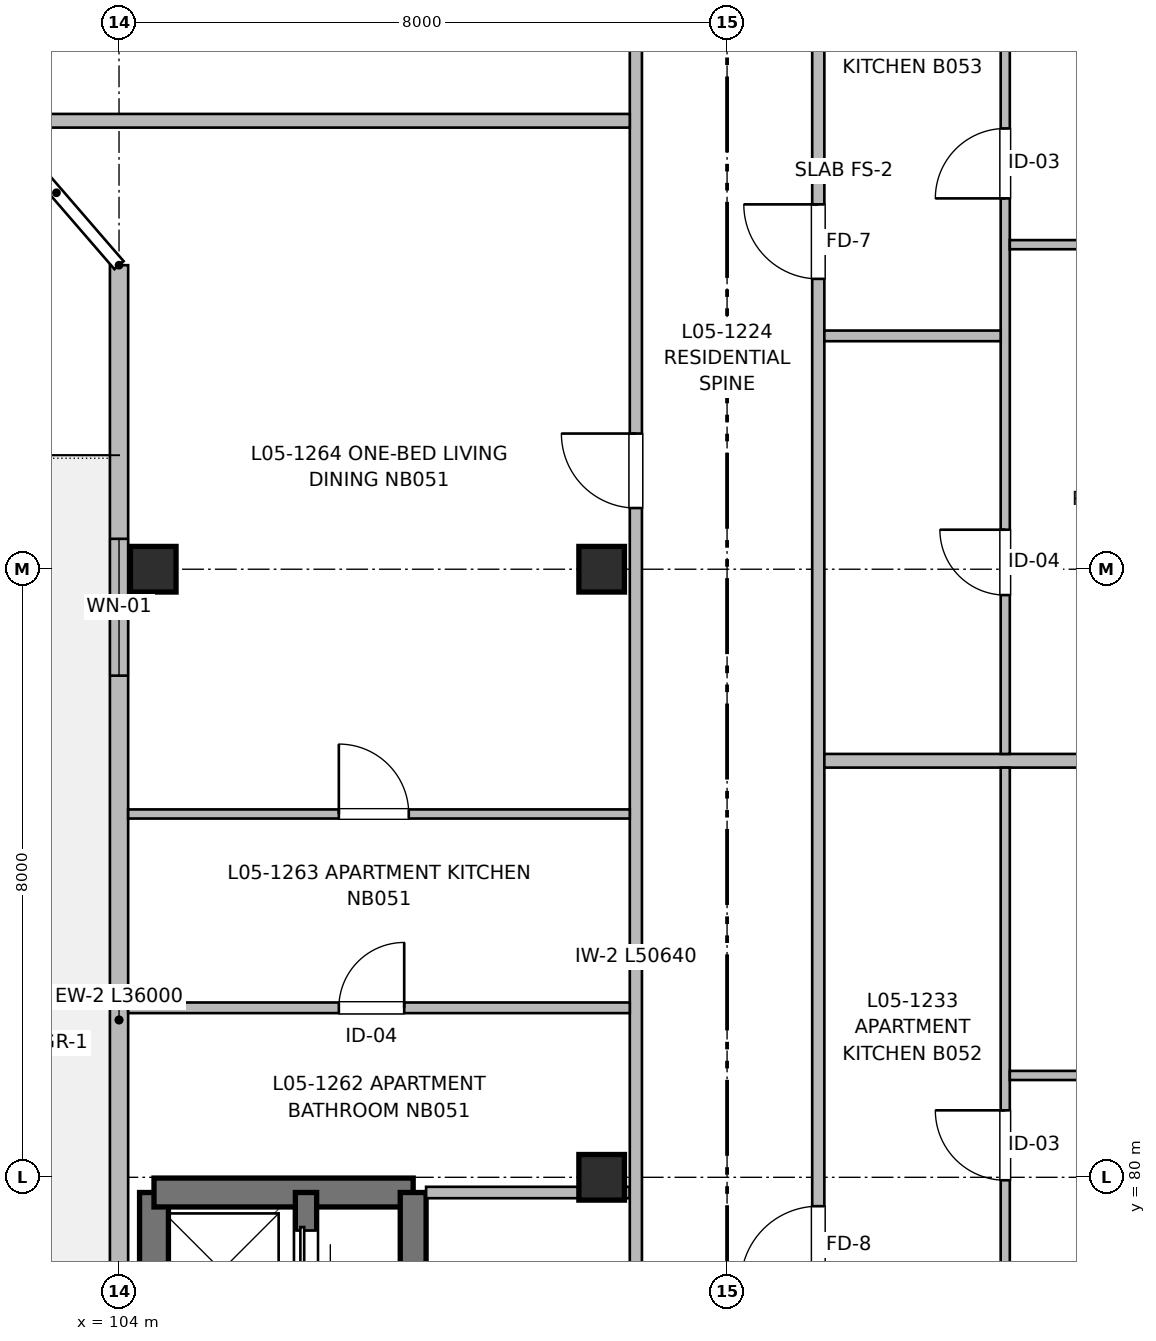
"""IFC4 building model, lengths in metres.
Left out: names, types, materials, properties, quantities, classifications, styles, units other than length and angle.
Written with IfcOpenShell. Run it as: python <this file> out.ifc"""

import sys

from ifc_helpers import new_model, si_unit, direction, frame, frame_2d, origin, origin_2d, place, context, subcontext, project, spatial, rectangle, extrude, element, fill, save


model = new_model("IFC4")
c1 = context("Model", 3, precision=1e-05, world=origin(), true_north=direction((0.0, 1.0)))
c2 = subcontext(c1, "Body", "Model", "MODEL_VIEW")
j1 = project(units=[si_unit("LENGTHUNIT", "METRE"), si_unit("PLANEANGLEUNIT", "RADIAN")], contexts=[c1])
p1 = place(None, origin())
s1 = spatial("IfcSite", under=j1, at=p1, CompositionType="ELEMENT")
p2 = place(p1, origin())
s2 = spatial("IfcBuilding", under=s1, at=p2, CompositionType="ELEMENT")
p3 = place(p2, frame((0.0, 0.0, 16.96)))
s3 = spatial("IfcBuildingStorey", under=s2, at=p3, CompositionType="ELEMENT", Elevation=16.96)
for number, where, z_axis, x_axis in (
    (1, (104.45, 88.0, 0.0), (0.0, 0.0, 1.0), (1.0, 0.0, 0.0)),
    (2, (110.35, 80.0, 0.0), (0.0, 0.0, 1.0), (1.0, 0.0, 0.0)),
    (3, (110.35, 88.0, 0.0), (0.0, 0.0, 1.0), (1.0, 0.0, 0.0)),
):
    element("IfcColumn", number, at=place(p3, frame(where, z_axis=z_axis, x_axis=x_axis)), inside=s3, PredefinedType="COLUMN", context=c2, shape_type="SweptSolid", body=[
        extrude(rectangle(XDim=0.6, YDim=0.6, at=origin_2d()), origin(), (0.0, 0.0, 1.0), 3.2),
    ])
p4 = place(p3, frame((104.46, 67.35, 0.0), z_axis=(0.0, 0.0, 1.0), x_axis=(0.0, 1.0, 0.0)))
e4 = element("IfcWall", 4, at=p4, inside=s3, PredefinedType="SHEAR", context=c2, shape_type="SweptSolid", body=[
    extrude(rectangle(XDim=12.45, YDim=0.38, at=frame_2d((6.225, 0.0))), origin(), (0.0, 0.0, 1.0), 3.2),
])
p5 = place(p4, frame((2.2, 0.0, 0.97)))
e5 = element("IfcOpeningElement", 5, at=p5, cuts=e4, PredefinedType="OPENING", context=c2, shape_type="SweptSolid", body=[
    extrude(rectangle(XDim=0.95, YDim=1.25, at=frame_2d((0.475, 0.625))), frame((0.0, 0.2, 0.0), z_axis=(0.0, -1.0, 0.0), x_axis=(1.0, 0.0, 0.0)), (0.0, 0.0, 1.0), 0.4),
])
p6 = place(p3, frame((104.46, 79.8, 0.0), z_axis=(0.0, 0.0, 1.0), x_axis=(1.0, 0.0, 0.0)))
e6 = element("IfcWall", 6, at=p6, inside=s3, PredefinedType="SHEAR", context=c2, shape_type="SweptSolid", body=[
    extrude(rectangle(XDim=3.41, YDim=0.38, at=frame_2d((1.705, 0.0))), origin(), (0.0, 0.0, 1.0), 3.2),
])
p7 = place(p3, frame((107.87, 79.8, 0.0), z_axis=(0.0, 0.0, 1.0), x_axis=(0.0, -1.0, 0.0)))
e7 = element("IfcWall", 7, at=p7, inside=s3, PredefinedType="SHEAR", context=c2, shape_type="SweptSolid", body=[
    extrude(rectangle(XDim=12.45, YDim=0.34, at=frame_2d((6.225, 0.0))), origin(), (0.0, 0.0, 1.0), 3.2),
])
p8 = place(p7, frame((10.85, 0.0, 0.0)))
e8 = element("IfcOpeningElement", 8, at=p8, cuts=e7, PredefinedType="OPENING", context=c2, shape_type="SweptSolid", body=[
    extrude(rectangle(XDim=1.05, YDim=2.15, at=frame_2d((0.525, 1.075))), frame((0.0, 0.18, 0.0), z_axis=(0.0, -1.0, 0.0), x_axis=(1.0, 0.0, 0.0)), (0.0, 0.0, 1.0), 0.36),
])
p9 = place(p3, frame((106.46, 74.55, 0.0), z_axis=(0.0, 0.0, 1.0), x_axis=(0.0, 1.0, 0.0)))
e9 = element("IfcWall", 9, at=p9, inside=s3, PredefinedType="SHEAR", context=c2, shape_type="SweptSolid", body=[
    extrude(rectangle(XDim=5.25, YDim=0.28, at=frame_2d((2.625, 0.0))), origin(), (0.0, 0.0, 1.0), 3.2),
])
p10 = place(p9, frame((1.15, 0.0, 0.0)))
e10 = element("IfcOpeningElement", 10, at=p10, cuts=e9, PredefinedType="OPENING", context=c2, shape_type="SweptSolid", body=[
    extrude(rectangle(XDim=1.0, YDim=2.15, at=frame_2d((0.5, 1.075))), frame((0.0, 0.15, 0.0), z_axis=(0.0, -1.0, 0.0), x_axis=(1.0, 0.0, 0.0)), (0.0, 0.0, 1.0), 0.3),
])
p11 = place(p9, frame((3.85, 0.0, 0.0)))
e11 = element("IfcOpeningElement", 11, at=p11, cuts=e9, PredefinedType="OPENING", context=c2, shape_type="SweptSolid", body=[
    extrude(rectangle(XDim=0.9, YDim=2.15, at=frame_2d((0.45, 1.075))), frame((0.0, 0.15, 0.0), z_axis=(0.0, -1.0, 0.0), x_axis=(1.0, 0.0, 0.0)), (0.0, 0.0, 1.0), 0.3),
])
p12 = place(p3, frame((104.0, 56.0, 0.0), z_axis=(0.0, 0.0, 1.0), x_axis=(0.0, 1.0, 0.0)))
e12 = element("IfcWall", 12, at=p12, inside=s3, PredefinedType="SOLIDWALL", context=c2, shape_type="SweptSolid", body=[
    extrude(rectangle(XDim=36.0, YDim=0.24, at=frame_2d((18.0, 0.0))), origin(), (0.0, 0.0, 1.0), 2.98),
])
p13 = place(p12, frame((3.9, 0.0, 0.0)))
e13 = element("IfcOpeningElement", 13, at=p13, cuts=e12, PredefinedType="OPENING", context=c2, shape_type="SweptSolid", body=[
    extrude(rectangle(XDim=1.2, YDim=2.2, at=frame_2d((0.6, 1.1))), frame((0.0, 0.13, 0.0), z_axis=(0.0, -1.0, 0.0), x_axis=(1.0, 0.0, 0.0)), (0.0, 0.0, 1.0), 0.26),
])
p14 = place(p12, frame((5.8, 0.0, 0.82)))
e14 = element("IfcOpeningElement", 14, at=p14, cuts=e12, PredefinedType="OPENING", context=c2, shape_type="SweptSolid", body=[
    extrude(rectangle(XDim=1.55, YDim=1.4, at=frame_2d((0.775, 0.7))), frame((0.0, 0.13, 0.0), z_axis=(0.0, -1.0, 0.0), x_axis=(1.0, 0.0, 0.0)), (0.0, 0.0, 1.0), 0.26),
])
p15 = place(p12, frame((12.2, 0.0, 0.67)))
e15 = element("IfcOpeningElement", 15, at=p15, cuts=e12, PredefinedType="OPENING", context=c2, shape_type="SweptSolid", body=[
    extrude(rectangle(XDim=2.6, YDim=1.55, at=frame_2d((1.3, 0.775))), frame((0.0, 0.13, 0.0), z_axis=(0.0, -1.0, 0.0), x_axis=(1.0, 0.0, 0.0)), (0.0, 0.0, 1.0), 0.26),
])
p16 = place(p12, frame((19.86, 0.0, 0.72)))
e16 = element("IfcOpeningElement", 16, at=p16, cuts=e12, PredefinedType="OPENING", context=c2, shape_type="SweptSolid", body=[
    extrude(rectangle(XDim=1.68, YDim=1.5, at=frame_2d((0.84, 0.75))), frame((0.0, 0.13, 0.0), z_axis=(0.0, -1.0, 0.0), x_axis=(1.0, 0.0, 0.0)), (0.0, 0.0, 1.0), 0.26),
])
p17 = place(p12, frame((30.6, 0.0, 0.72)))
e17 = element("IfcOpeningElement", 17, at=p17, cuts=e12, PredefinedType="OPENING", context=c2, shape_type="SweptSolid", body=[
    extrude(rectangle(XDim=1.8, YDim=1.5, at=frame_2d((0.9, 0.75))), frame((0.0, 0.13, 0.0), z_axis=(0.0, -1.0, 0.0), x_axis=(1.0, 0.0, 0.0)), (0.0, 0.0, 1.0), 0.26),
])
p18 = place(p3, frame((108.04, 79.8, 0.0), z_axis=(0.0, 0.0, 1.0), x_axis=(1.0, 0.0, 0.0)))
e18 = element("IfcWall", 18, at=p18, inside=s3, PredefinedType="PARTITIONING", context=c2, shape_type="SweptSolid", body=[
    extrude(rectangle(XDim=2.68, YDim=0.15, at=frame_2d((1.34, 0.0))), origin(), (0.0, 0.0, 1.0), 2.935),
])
p19 = place(p3, frame((110.8, 56.16, 0.0), z_axis=(0.0, 0.0, 1.0), x_axis=(0.0, 1.0, 0.0)))
e19 = element("IfcWall", 19, at=p19, inside=s3, PredefinedType="PARTITIONING", context=c2, shape_type="SweptSolid", body=[
    extrude(rectangle(XDim=50.64, YDim=0.16, at=frame_2d((25.32, 0.0))), origin(), (0.0, 0.0, 1.0), 2.935),
])
p20 = place(p19, frame((12.84, 0.0, 0.0)))
e20 = element("IfcOpeningElement", 20, at=p20, cuts=e19, PredefinedType="OPENING", context=c2, shape_type="SweptSolid", body=[
    extrude(rectangle(XDim=1.1, YDim=2.15, at=frame_2d((0.55, 1.075))), frame((0.0, 0.09, 0.0), z_axis=(0.0, -1.0, 0.0), x_axis=(1.0, 0.0, 0.0)), (0.0, 0.0, 1.0), 0.18),
])
p21 = place(p19, frame((19.24, 0.0, 0.0)))
e21 = element("IfcOpeningElement", 21, at=p21, cuts=e19, PredefinedType="OPENING", context=c2, shape_type="SweptSolid", body=[
    extrude(rectangle(XDim=1.6, YDim=2.15, at=frame_2d((0.8, 1.075))), frame((0.0, 0.09, 0.0), z_axis=(0.0, -1.0, 0.0), x_axis=(1.0, 0.0, 0.0)), (0.0, 0.0, 1.0), 0.18),
])
p22 = place(p19, frame((1.8, 0.0, 0.0)))
e22 = element("IfcOpeningElement", 22, at=p22, cuts=e19, PredefinedType="OPENING", context=c2, shape_type="SweptSolid", body=[
    extrude(rectangle(XDim=0.96, YDim=2.15, at=frame_2d((0.48, 1.075))), frame((0.0, 0.09, 0.0), z_axis=(0.0, -1.0, 0.0), x_axis=(1.0, 0.0, 0.0)), (0.0, 0.0, 1.0), 0.18),
])
p23 = place(p19, frame((32.645, 0.0, 0.0)))
e23 = element("IfcOpeningElement", 23, at=p23, cuts=e19, PredefinedType="OPENING", context=c2, shape_type="SweptSolid", body=[
    extrude(rectangle(XDim=0.98, YDim=2.15, at=frame_2d((0.49, 1.075))), frame((0.0, 0.09, 0.0), z_axis=(0.0, -1.0, 0.0), x_axis=(1.0, 0.0, 0.0)), (0.0, 0.0, 1.0), 0.18),
])
p24 = place(p19, frame((41.255, 0.0, 0.0)))
e24 = element("IfcOpeningElement", 24, at=p24, cuts=e19, PredefinedType="OPENING", context=c2, shape_type="SweptSolid", body=[
    extrude(rectangle(XDim=0.98, YDim=2.15, at=frame_2d((0.49, 1.075))), frame((0.0, 0.09, 0.0), z_axis=(0.0, -1.0, 0.0), x_axis=(1.0, 0.0, 0.0)), (0.0, 0.0, 1.0), 0.18),
])
p25 = place(p3, frame((113.2, 56.16, 0.0), z_axis=(0.0, 0.0, 1.0), x_axis=(0.0, 1.0, 0.0)))
e25 = element("IfcWall", 25, at=p25, inside=s3, PredefinedType="PARTITIONING", context=c2, shape_type="SweptSolid", body=[
    extrude(rectangle(XDim=50.64, YDim=0.16, at=frame_2d((25.32, 0.0))), origin(), (0.0, 0.0, 1.0), 2.935),
])
p26 = place(p25, frame((7.69, 0.0, 0.0)))
e26 = element("IfcOpeningElement", 26, at=p26, cuts=e25, PredefinedType="OPENING", context=c2, shape_type="SweptSolid", body=[
    extrude(rectangle(XDim=0.98, YDim=2.15, at=frame_2d((0.49, 1.075))), frame((0.0, 0.09, 0.0), z_axis=(0.0, -1.0, 0.0), x_axis=(1.0, 0.0, 0.0)), (0.0, 0.0, 1.0), 0.18),
])
p27 = place(p25, frame((22.44, 0.0, 0.0)))
e27 = element("IfcOpeningElement", 27, at=p27, cuts=e25, PredefinedType="OPENING", context=c2, shape_type="SweptSolid", body=[
    extrude(rectangle(XDim=1.02, YDim=2.15, at=frame_2d((0.51, 1.075))), frame((0.0, 0.09, 0.0), z_axis=(0.0, -1.0, 0.0), x_axis=(1.0, 0.0, 0.0)), (0.0, 0.0, 1.0), 0.18),
])
p28 = place(p25, frame((35.66, 0.0, 0.0)))
e28 = element("IfcOpeningElement", 28, at=p28, cuts=e25, PredefinedType="OPENING", context=c2, shape_type="SweptSolid", body=[
    extrude(rectangle(XDim=0.98, YDim=2.15, at=frame_2d((0.49, 1.075))), frame((0.0, 0.09, 0.0), z_axis=(0.0, -1.0, 0.0), x_axis=(1.0, 0.0, 0.0)), (0.0, 0.0, 1.0), 0.18),
])
p29 = place(p25, frame((46.44, 0.0, 0.0)))
e29 = element("IfcOpeningElement", 29, at=p29, cuts=e25, PredefinedType="OPENING", context=c2, shape_type="SweptSolid", body=[
    extrude(rectangle(XDim=0.98, YDim=2.15, at=frame_2d((0.49, 1.075))), frame((0.0, 0.09, 0.0), z_axis=(0.0, -1.0, 0.0), x_axis=(1.0, 0.0, 0.0)), (0.0, 0.0, 1.0), 0.18),
])
p30 = place(p3, frame((113.28, 85.48, 0.0), z_axis=(0.0, 0.0, 1.0), x_axis=(1.0, 0.0, 0.0)))
e30 = element("IfcWall", 30, at=p30, inside=s3, PredefinedType="PARTITIONING", context=c2, shape_type="SweptSolid", body=[
    extrude(rectangle(XDim=6.6, YDim=0.18, at=frame_2d((3.3, 0.0))), origin(), (0.0, 0.0, 1.0), 2.935),
])
p31 = place(p3, frame((115.66, 71.42, 0.0), z_axis=(0.0, 0.0, 1.0), x_axis=(0.0, 1.0, 0.0)))
e31 = element("IfcWall", 31, at=p31, inside=s3, PredefinedType="PARTITIONING", context=c2, shape_type="SweptSolid", body=[
    extrude(rectangle(XDim=13.97, YDim=0.12, at=frame_2d((6.985, 0.0))), origin(), (0.0, 0.0, 1.0), 2.935),
])
p32 = place(p31, frame((2.443, 0.0, 0.0)))
e32 = element("IfcOpeningElement", 32, at=p32, cuts=e31, PredefinedType="OPENING", context=c2, shape_type="SweptSolid", body=[
    extrude(rectangle(XDim=0.94, YDim=2.1, at=frame_2d((0.47, 1.05))), frame((0.0, 0.07, 0.0), z_axis=(0.0, -1.0, 0.0), x_axis=(1.0, 0.0, 0.0)), (0.0, 0.0, 1.0), 0.14),
])
p33 = place(p31, frame((8.541, 0.0, 0.0)))
e33 = element("IfcOpeningElement", 33, at=p33, cuts=e31, PredefinedType="OPENING", context=c2, shape_type="SweptSolid", body=[
    extrude(rectangle(XDim=0.92, YDim=2.1, at=frame_2d((0.46, 1.05))), frame((0.0, 0.07, 0.0), z_axis=(0.0, -1.0, 0.0), x_axis=(1.0, 0.0, 0.0)), (0.0, 0.0, 1.0), 0.14),
])
p34 = place(p3, frame((115.72, 81.34, 0.0), z_axis=(0.0, 0.0, 1.0), x_axis=(1.0, 0.0, 0.0)))
e34 = element("IfcWall", 34, at=p34, inside=s3, PredefinedType="PARTITIONING", context=c2, shape_type="SweptSolid", body=[
    extrude(rectangle(XDim=4.16, YDim=0.12, at=frame_2d((2.08, 0.0))), origin(), (0.0, 0.0, 1.0), 2.935),
])
p35 = place(p34, frame((1.64, 0.0, 0.0)))
e35 = element("IfcOpeningElement", 35, at=p35, cuts=e34, PredefinedType="OPENING", context=c2, shape_type="SweptSolid", body=[
    extrude(rectangle(XDim=0.88, YDim=2.1, at=frame_2d((0.44, 1.05))), frame((0.0, 0.07, 0.0), z_axis=(0.0, -1.0, 0.0), x_axis=(1.0, 0.0, 0.0)), (0.0, 0.0, 1.0), 0.14),
])
p36 = place(p3, frame((115.66, 85.57, 0.0), z_axis=(0.0, 0.0, 1.0), x_axis=(0.0, 1.0, 0.0)))
e36 = element("IfcWall", 36, at=p36, inside=s3, PredefinedType="PARTITIONING", context=c2, shape_type="SweptSolid", body=[
    extrude(rectangle(XDim=11.96, YDim=0.12, at=frame_2d((5.98, 0.0))), origin(), (0.0, 0.0, 1.0), 2.935),
])
p37 = place(p36, frame((2.09, 0.0, 0.0)))
e37 = element("IfcOpeningElement", 37, at=p37, cuts=e36, PredefinedType="OPENING", context=c2, shape_type="SweptSolid", body=[
    extrude(rectangle(XDim=0.86, YDim=2.1, at=frame_2d((0.43, 1.05))), frame((0.0, 0.07, 0.0), z_axis=(0.0, -1.0, 0.0), x_axis=(1.0, 0.0, 0.0)), (0.0, 0.0, 1.0), 0.14),
])
p38 = place(p36, frame((7.309, 0.0, 0.0)))
e38 = element("IfcOpeningElement", 38, at=p38, cuts=e36, PredefinedType="OPENING", context=c2, shape_type="SweptSolid", body=[
    extrude(rectangle(XDim=0.92, YDim=2.1, at=frame_2d((0.46, 1.05))), frame((0.0, 0.07, 0.0), z_axis=(0.0, -1.0, 0.0), x_axis=(1.0, 0.0, 0.0)), (0.0, 0.0, 1.0), 0.14),
])
p39 = place(p3, frame((113.28, 91.07, 0.0), z_axis=(0.0, 0.0, 1.0), x_axis=(1.0, 0.0, 0.0)))
e39 = element("IfcWall", 39, at=p39, inside=s3, PredefinedType="PARTITIONING", context=c2, shape_type="SweptSolid", body=[
    extrude(rectangle(XDim=2.32, YDim=0.14, at=frame_2d((1.16, 0.0))), origin(), (0.0, 0.0, 1.0), 2.935),
])
p40 = place(p3, frame((115.72, 92.27, 0.0), z_axis=(0.0, 0.0, 1.0), x_axis=(1.0, 0.0, 0.0)))
e40 = element("IfcWall", 40, at=p40, inside=s3, PredefinedType="PARTITIONING", context=c2, shape_type="SweptSolid", body=[
    extrude(rectangle(XDim=7.655, YDim=0.12, at=frame_2d((3.827, 0.0))), origin(), (0.0, 0.0, 1.0), 2.935),
])
p41 = place(p40, frame((1.63, 0.0, 0.0)))
e41 = element("IfcOpeningElement", 41, at=p41, cuts=e40, PredefinedType="OPENING", context=c2, shape_type="SweptSolid", body=[
    extrude(rectangle(XDim=0.9, YDim=2.1, at=frame_2d((0.45, 1.05))), frame((0.0, 0.07, 0.0), z_axis=(0.0, -1.0, 0.0), x_axis=(1.0, 0.0, 0.0)), (0.0, 0.0, 1.0), 0.14),
])
p42 = place(p3, frame((102.411, 93.9, 0.0), z_axis=(0.0, 0.0, 1.0), x_axis=(1.0, 0.0, 0.0)))
e42 = element("IfcWall", 42, at=p42, inside=s3, PredefinedType="PARTITIONING", context=c2, shape_type="SweptSolid", body=[
    extrude(rectangle(XDim=8.309, YDim=0.18, at=frame_2d((4.155, 0.0))), origin(), (0.0, 0.0, 1.0), 2.935),
])
p43 = place(p3, frame((104.12, 82.23, 0.0), z_axis=(0.0, 0.0, 1.0), x_axis=(1.0, 0.0, 0.0)))
e43 = element("IfcWall", 43, at=p43, inside=s3, PredefinedType="PARTITIONING", context=c2, shape_type="SweptSolid", body=[
    extrude(rectangle(XDim=6.6, YDim=0.14, at=frame_2d((3.3, 0.0))), origin(), (0.0, 0.0, 1.0), 2.935),
])
p44 = place(p43, frame((2.772, 0.0, 0.0)))
e44 = element("IfcOpeningElement", 44, at=p44, cuts=e43, PredefinedType="OPENING", context=c2, shape_type="SweptSolid", body=[
    extrude(rectangle(XDim=0.86, YDim=2.1, at=frame_2d((0.43, 1.05))), frame((0.0, 0.08, 0.0), z_axis=(0.0, -1.0, 0.0), x_axis=(1.0, 0.0, 0.0)), (0.0, 0.0, 1.0), 0.16),
])
p45 = place(p3, frame((104.12, 84.78, 0.0), z_axis=(0.0, 0.0, 1.0), x_axis=(1.0, 0.0, 0.0)))
e45 = element("IfcWall", 45, at=p45, inside=s3, PredefinedType="PARTITIONING", context=c2, shape_type="SweptSolid", body=[
    extrude(rectangle(XDim=6.6, YDim=0.12, at=frame_2d((3.3, 0.0))), origin(), (0.0, 0.0, 1.0), 2.935),
])
p46 = place(p45, frame((2.772, 0.0, 0.0)))
e46 = element("IfcOpeningElement", 46, at=p46, cuts=e45, PredefinedType="OPENING", context=c2, shape_type="SweptSolid", body=[
    extrude(rectangle(XDim=0.92, YDim=2.1, at=frame_2d((0.46, 1.05))), frame((0.0, 0.07, 0.0), z_axis=(0.0, -1.0, 0.0), x_axis=(1.0, 0.0, 0.0)), (0.0, 0.0, 1.0), 0.14),
])
p47 = place(p11, origin())
e47 = element("IfcDoor", 47, at=p47, inside=s3, OperationType="SLIDING_TO_RIGHT", PredefinedType="DOOR", context=c2, shape_type="SweptSolid", body=[
    extrude(rectangle(XDim=0.9, YDim=2.15, at=frame_2d((0.45, 1.075))), frame((0.0, 0.025, 0.0), z_axis=(0.0, -1.0, 0.0), x_axis=(1.0, 0.0, 0.0)), (0.0, 0.0, 1.0), 0.05),
])
fill(e11, e47)
p48 = place(p17, origin())
e48 = element("IfcWindow", 48, at=p48, inside=s3, PartitioningType="SINGLE_PANEL", PredefinedType="WINDOW", context=c2, shape_type="SweptSolid", body=[
    extrude(rectangle(XDim=1.8, YDim=1.5, at=frame_2d((0.9, 0.75))), frame((0.0, 0.03, 0.0), z_axis=(0.0, -1.0, 0.0), x_axis=(1.0, 0.0, 0.0)), (0.0, 0.0, 1.0), 0.06),
])
fill(e17, e48)
p49 = place(p33, origin())
e49 = element("IfcDoor", 49, at=p49, inside=s3, OperationType="SINGLE_SWING_RIGHT", PredefinedType="DOOR", context=c2, shape_type="SweptSolid", body=[
    extrude(rectangle(XDim=0.92, YDim=2.1, at=frame_2d((0.46, 1.05))), frame((0.0, 0.025, 0.0), z_axis=(0.0, -1.0, 0.0), x_axis=(1.0, 0.0, 0.0)), (0.0, 0.0, 1.0), 0.05),
])
fill(e33, e49)
p50 = place(p27, origin())
e50 = element("IfcDoor", 50, at=p50, inside=s3, OperationType="SINGLE_SWING_LEFT", PredefinedType="DOOR", context=c2, shape_type="SweptSolid", body=[
    extrude(rectangle(XDim=1.02, YDim=2.15, at=frame_2d((0.51, 1.075))), frame((0.0, 0.025, 0.0), z_axis=(0.0, -1.0, 0.0), x_axis=(1.0, 0.0, 0.0)), (0.0, 0.0, 1.0), 0.05),
])
fill(e27, e50)
p51 = place(p37, origin())
e51 = element("IfcDoor", 51, at=p51, inside=s3, OperationType="SINGLE_SWING_RIGHT", PredefinedType="DOOR", context=c2, shape_type="SweptSolid", body=[
    extrude(rectangle(XDim=0.86, YDim=2.1, at=frame_2d((0.43, 1.05))), frame((0.0, 0.025, 0.0), z_axis=(0.0, -1.0, 0.0), x_axis=(1.0, 0.0, 0.0)), (0.0, 0.0, 1.0), 0.05),
])
fill(e37, e51)
p52 = place(p38, origin())
e52 = element("IfcDoor", 52, at=p52, inside=s3, OperationType="SINGLE_SWING_LEFT", PredefinedType="DOOR", context=c2, shape_type="SweptSolid", body=[
    extrude(rectangle(XDim=0.92, YDim=2.1, at=frame_2d((0.46, 1.05))), frame((0.0, 0.025, 0.0), z_axis=(0.0, -1.0, 0.0), x_axis=(1.0, 0.0, 0.0)), (0.0, 0.0, 1.0), 0.05),
])
fill(e38, e52)
p53 = place(p28, origin())
e53 = element("IfcDoor", 53, at=p53, inside=s3, OperationType="SINGLE_SWING_RIGHT", PredefinedType="DOOR", context=c2, shape_type="SweptSolid", body=[
    extrude(rectangle(XDim=0.98, YDim=2.15, at=frame_2d((0.49, 1.075))), frame((0.0, 0.025, 0.0), z_axis=(0.0, -1.0, 0.0), x_axis=(1.0, 0.0, 0.0)), (0.0, 0.0, 1.0), 0.05),
])
fill(e28, e53)
p54 = place(p44, origin())
e54 = element("IfcDoor", 54, at=p54, inside=s3, OperationType="SINGLE_SWING_RIGHT", PredefinedType="DOOR", context=c2, shape_type="SweptSolid", body=[
    extrude(rectangle(XDim=0.86, YDim=2.1, at=frame_2d((0.43, 1.05))), frame((0.0, 0.025, 0.0), z_axis=(0.0, -1.0, 0.0), x_axis=(1.0, 0.0, 0.0)), (0.0, 0.0, 1.0), 0.05),
])
fill(e44, e54)
p55 = place(p46, origin())
e55 = element("IfcDoor", 55, at=p55, inside=s3, OperationType="SINGLE_SWING_LEFT", PredefinedType="DOOR", context=c2, shape_type="SweptSolid", body=[
    extrude(rectangle(XDim=0.92, YDim=2.1, at=frame_2d((0.46, 1.05))), frame((0.0, 0.025, 0.0), z_axis=(0.0, -1.0, 0.0), x_axis=(1.0, 0.0, 0.0)), (0.0, 0.0, 1.0), 0.05),
])
fill(e46, e55)
p56 = place(p23, origin())
e56 = element("IfcDoor", 56, at=p56, inside=s3, OperationType="SINGLE_SWING_RIGHT", PredefinedType="DOOR", context=c2, shape_type="SweptSolid", body=[
    extrude(rectangle(XDim=0.98, YDim=2.15, at=frame_2d((0.49, 1.075))), frame((0.0, 0.025, 0.0), z_axis=(0.0, -1.0, 0.0), x_axis=(1.0, 0.0, 0.0)), (0.0, 0.0, 1.0), 0.05),
])
fill(e23, e56)
save(model, sys.argv[1])
